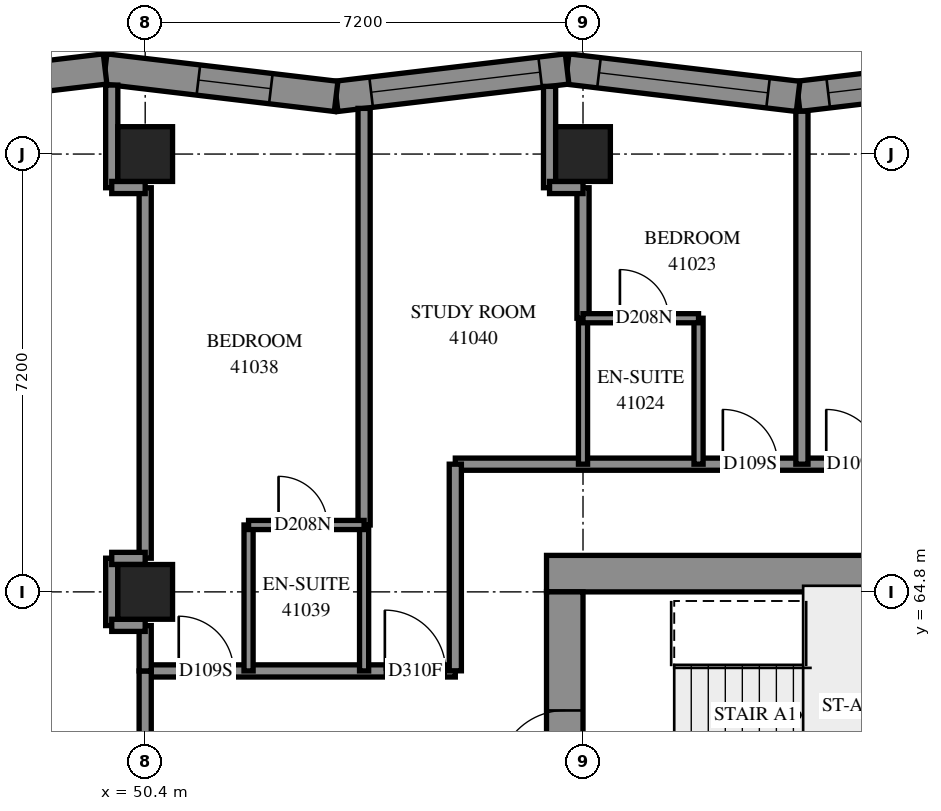
"""IFC4 building model, lengths in metres.
Left out: names, types, materials, properties, quantities, classifications, styles, units other than length and angle.
Written with IfcOpenShell. Run it as: python <this file> out.ifc"""

import sys

from ifc_helpers import new_model, si_unit, direction, frame, frame_2d, origin, origin_2d, place, context, subcontext, project, spatial, polyline, rectangle, outline, extrude, element, fill, save


model = new_model("IFC4")
c1 = context("Model", 3, precision=1e-05, world=origin(), true_north=direction((0.0, 1.0)))
c2 = subcontext(c1, "Body", "Model", "MODEL_VIEW")
j1 = project(units=[si_unit("LENGTHUNIT", "METRE"), si_unit("PLANEANGLEUNIT", "RADIAN")], contexts=[c1])
p1 = place(None, origin())
s1 = spatial("IfcSite", under=j1, at=p1, CompositionType="ELEMENT")
p2 = place(p1, origin())
s2 = spatial("IfcBuilding", under=s1, at=p2, CompositionType="ELEMENT")
p3 = place(p2, frame((0.0, 0.0, 152.4)))
s3 = spatial("IfcBuildingStorey", under=s2, at=p3, CompositionType="ELEMENT", Elevation=152.4)
for number, where, z_axis, x_axis in (
    (1, (50.4, 64.8, 0.0), (0.0, 0.0, 1.0), (1.0, 0.0, 0.0)),
    (2, (50.4, 72.0, 0.0), (0.0, 0.0, 1.0), (1.0, 0.0, 0.0)),
    (3, (57.6, 72.0, 0.0), (0.0, 0.0, 1.0), (1.0, 0.0, 0.0)),
):
    element("IfcColumn", number, at=place(p3, frame(where, z_axis=z_axis, x_axis=x_axis)), inside=s3, PredefinedType="COLUMN", context=c2, shape_type="SweptSolid", body=[
        extrude(rectangle(XDim=0.9, YDim=0.9, at=origin_2d()), origin(), (0.0, 0.0, 1.0), 3.1),
    ])
p4 = place(p3, frame((57.0, 65.1, -0.3), z_axis=(0.0, 0.0, 1.0), x_axis=(1.0, 0.0, 0.0)))
e4 = element("IfcWall", 4, at=p4, inside=s3, PredefinedType="SHEAR", context=c2, shape_type="SweptSolid", body=[
    extrude(rectangle(XDim=15.6, YDim=0.6, at=frame_2d((7.8, 0.0))), origin(), (0.0, 0.0, 1.0), 2.7),
])
p5 = place(p4, frame((10.6, 0.0, 0.3)))
e5 = element("IfcOpeningElement", 5, at=p5, cuts=e4, PredefinedType="OPENING", context=c2, shape_type="SweptSolid", body=[
    extrude(rectangle(XDim=0.8, YDim=2.1, at=frame_2d((0.4, 1.05))), frame((0.0, 0.31, 0.0), z_axis=(0.0, -1.0, 0.0), x_axis=(1.0, 0.0, 0.0)), (0.0, 0.0, 1.0), 0.62),
])
p6 = place(p3, frame((57.3, 50.4, -0.3), z_axis=(0.0, 0.0, 1.0), x_axis=(0.0, 1.0, 0.0)))
e6 = element("IfcWall", 6, at=p6, inside=s3, PredefinedType="SHEAR", context=c2, shape_type="SweptSolid", body=[
    extrude(rectangle(XDim=14.4, YDim=0.6, at=frame_2d((7.2, 0.0))), origin(), (0.0, 0.0, 1.0), 2.7),
])
p7 = place(p6, frame((4.55, 0.0, 0.3)))
e7 = element("IfcOpeningElement", 7, at=p7, cuts=e6, PredefinedType="OPENING", context=c2, shape_type="SweptSolid", body=[
    extrude(rectangle(XDim=1.1, YDim=2.1, at=frame_2d((0.55, 1.05))), frame((0.0, 0.31, 0.0), z_axis=(0.0, -1.0, 0.0), x_axis=(1.0, 0.0, 0.0)), (0.0, 0.0, 1.0), 0.62),
])
p8 = place(p6, frame((11.35, 0.0, 0.3)))
e8 = element("IfcOpeningElement", 8, at=p8, cuts=e6, PredefinedType="OPENING", context=c2, shape_type="SweptSolid", body=[
    extrude(rectangle(XDim=1.1, YDim=2.1, at=frame_2d((0.55, 1.05))), frame((0.0, 0.31, 0.0), z_axis=(0.0, -1.0, 0.0), x_axis=(1.0, 0.0, 0.0)), (0.0, 0.0, 1.0), 0.62),
])
p9 = place(p3, frame((64.937, 73.399, 0.0), z_axis=(0.0, 0.0, 1.0), x_axis=(-0.9930269402, -0.1178876415, 0.0)))
e9 = element("IfcWall", 9, at=p9, inside=s3, PredefinedType="SOLIDWALL", context=c2, shape_type="SweptSolid", body=[
    extrude(outline(polyline([(-0.03, -0.25), (3.796, -0.25), (3.855, 0.25), (0.03, 0.25), (-0.03, -0.25)])), origin(), (0.0, 0.0, 1.0), 3.1),
])
p10 = place(p9, frame((0.528, 0.0, 0.45)))
e10 = element("IfcOpeningElement", 10, at=p10, cuts=e9, PredefinedType="OPENING", context=c2, shape_type="SweptSolid", body=[
    extrude(rectangle(XDim=2.8, YDim=2.5, at=frame_2d((1.4, 1.25))), frame((0.0, 0.26, 0.0), z_axis=(0.0, -1.0, 0.0), x_axis=(1.0, 0.0, 0.0)), (0.0, 0.0, 1.0), 0.52),
])
p11 = place(p3, frame((61.138, 72.948, 0.0), z_axis=(0.0, 0.0, 1.0), x_axis=(-0.9930269402, 0.1178876415, 0.0)))
e11 = element("IfcWall", 11, at=p11, inside=s3, PredefinedType="SOLIDWALL", context=c2, shape_type="SweptSolid", body=[
    extrude(outline(polyline([(0.03, -0.25), (3.855, -0.25), (3.796, 0.25), (-0.03, 0.25), (0.03, -0.25)])), origin(), (0.0, 0.0, 1.0), 3.1),
])
p12 = place(p11, frame((0.498, 0.0, 0.45)))
e12 = element("IfcOpeningElement", 12, at=p12, cuts=e11, PredefinedType="OPENING", context=c2, shape_type="SweptSolid", body=[
    extrude(rectangle(XDim=2.8, YDim=2.5, at=frame_2d((1.4, 1.25))), frame((0.0, 0.26, 0.0), z_axis=(0.0, -1.0, 0.0), x_axis=(1.0, 0.0, 0.0)), (0.0, 0.0, 1.0), 0.52),
])
p13 = place(p3, frame((57.339, 73.399, 0.0), z_axis=(0.0, 0.0, 1.0), x_axis=(-0.9930265769, -0.1178907016, 0.0)))
e13 = element("IfcWall", 13, at=p13, inside=s3, PredefinedType="SOLIDWALL", context=c2, shape_type="SweptSolid", body=[
    extrude(outline(polyline([(-0.03, -0.25), (3.796, -0.25), (3.855, 0.25), (0.03, 0.25), (-0.03, -0.25)])), origin(), (0.0, 0.0, 1.0), 3.1),
])
p14 = place(p13, frame((0.446, 0.0, 0.45)))
e14 = element("IfcOpeningElement", 14, at=p14, cuts=e13, PredefinedType="OPENING", context=c2, shape_type="SweptSolid", body=[
    extrude(rectangle(XDim=2.8, YDim=2.5, at=frame_2d((1.4, 1.25))), frame((0.0, 0.26, 0.0), z_axis=(0.0, -1.0, 0.0), x_axis=(1.0, 0.0, 0.0)), (0.0, 0.0, 1.0), 0.52),
])
p15 = place(p3, frame((53.54, 72.948, 0.0), z_axis=(0.0, 0.0, 1.0), x_axis=(-0.9930269402, 0.1178876415, 0.0)))
e15 = element("IfcWall", 15, at=p15, inside=s3, PredefinedType="SOLIDWALL", context=c2, shape_type="SweptSolid", body=[
    extrude(outline(polyline([(0.03, -0.25), (3.855, -0.25), (3.796, 0.25), (-0.03, 0.25), (0.03, -0.25)])), origin(), (0.0, 0.0, 1.0), 3.1),
])
p16 = place(p15, frame((1.081, 0.0, 0.45)))
e16 = element("IfcOpeningElement", 16, at=p16, cuts=e15, PredefinedType="OPENING", context=c2, shape_type="SweptSolid", body=[
    extrude(rectangle(XDim=1.2, YDim=2.5, at=frame_2d((0.6, 1.25))), frame((0.0, 0.26, 0.0), z_axis=(0.0, -1.0, 0.0), x_axis=(1.0, 0.0, 0.0)), (0.0, 0.0, 1.0), 0.52),
])
p17 = place(p3, frame((49.741, 73.399, 0.0), z_axis=(0.0, 0.0, 1.0), x_axis=(-0.9930265769, -0.1178907016, 0.0)))
e17 = element("IfcWall", 17, at=p17, inside=s3, PredefinedType="SOLIDWALL", context=c2, shape_type="SweptSolid", body=[
    extrude(outline(polyline([(-0.03, -0.25), (3.796, -0.25), (3.855, 0.25), (0.03, 0.25), (-0.03, -0.25)])), origin(), (0.0, 0.0, 1.0), 3.1),
])
p18 = place(p17, frame((0.996, 0.0, 0.45)))
e18 = element("IfcOpeningElement", 18, at=p18, cuts=e17, PredefinedType="OPENING", context=c2, shape_type="SweptSolid", body=[
    extrude(rectangle(XDim=1.2, YDim=2.5, at=frame_2d((0.6, 1.25))), frame((0.0, 0.26, 0.0), z_axis=(0.0, -1.0, 0.0), x_axis=(1.0, 0.0, 0.0)), (0.0, 0.0, 1.0), 0.52),
])
p19 = place(p3, frame((55.5, 66.9, 0.0), z_axis=(0.0, 0.0, 1.0), x_axis=(1.0, 0.0, 0.0)))
e19 = element("IfcWall", 19, at=p19, inside=s3, PredefinedType="PARTITIONING", context=c2, shape_type="SweptSolid", body=[
    extrude(rectangle(XDim=18.6, YDim=0.2, at=frame_2d((9.3, 0.0))), origin(), (0.0, 0.0, 1.0), 3.1),
])
p20 = place(p19, frame((4.4, 0.0, 0.0)))
e20 = element("IfcOpeningElement", 20, at=p20, cuts=e19, PredefinedType="OPENING", context=c2, shape_type="SweptSolid", body=[
    extrude(rectangle(XDim=0.9, YDim=2.1, at=frame_2d((0.45, 1.05))), frame((0.0, 0.11, 0.0), z_axis=(0.0, -1.0, 0.0), x_axis=(1.0, 0.0, 0.0)), (0.0, 0.0, 1.0), 0.22),
])
p21 = place(p19, frame((6.1, 0.0, 0.0)))
e21 = element("IfcOpeningElement", 21, at=p21, cuts=e19, PredefinedType="OPENING", context=c2, shape_type="SweptSolid", body=[
    extrude(rectangle(XDim=0.9, YDim=2.1, at=frame_2d((0.45, 1.05))), frame((0.0, 0.11, 0.0), z_axis=(0.0, -1.0, 0.0), x_axis=(1.0, 0.0, 0.0)), (0.0, 0.0, 1.0), 0.22),
])
p22 = place(p19, frame((11.65, 0.0, 0.0)))
e22 = element("IfcOpeningElement", 22, at=p22, cuts=e19, PredefinedType="OPENING", context=c2, shape_type="SweptSolid", body=[
    extrude(rectangle(XDim=0.9, YDim=2.1, at=frame_2d((0.45, 1.05))), frame((0.0, 0.11, 0.0), z_axis=(0.0, -1.0, 0.0), x_axis=(1.0, 0.0, 0.0)), (0.0, 0.0, 1.0), 0.22),
])
p23 = place(p19, frame((13.3, 0.0, 0.0)))
e23 = element("IfcOpeningElement", 23, at=p23, cuts=e19, PredefinedType="OPENING", context=c2, shape_type="SweptSolid", body=[
    extrude(rectangle(XDim=0.9, YDim=2.1, at=frame_2d((0.45, 1.05))), frame((0.0, 0.11, 0.0), z_axis=(0.0, -1.0, 0.0), x_axis=(1.0, 0.0, 0.0)), (0.0, 0.0, 1.0), 0.22),
])
p24 = place(p3, frame((54.0, 65.9, 0.0), z_axis=(0.0, 0.0, 1.0), x_axis=(0.0, 1.0, 0.0)))
e24 = element("IfcWall", 24, at=p24, inside=s3, PredefinedType="PARTITIONING", context=c2, shape_type="SweptSolid", body=[
    extrude(rectangle(XDim=6.851, YDim=0.2, at=frame_2d((3.425, 0.0))), origin(), (0.0, 0.0, 1.0), 3.1),
])
p25 = place(p3, frame((50.4, 65.354, 0.0), z_axis=(0.0, 0.0, 1.0), x_axis=(0.0, 1.0, 0.0)))
e25 = element("IfcWall", 25, at=p25, inside=s3, PredefinedType="PARTITIONING", context=c2, shape_type="SweptSolid", body=[
    extrude(rectangle(XDim=6.092, YDim=0.2, at=frame_2d((3.046, 0.0))), origin(), (0.0, 0.0, 1.0), 3.1),
])
p26 = place(p3, frame((61.2, 66.9, 0.0), z_axis=(0.0, 0.0, 1.0), x_axis=(0.0, 1.0, 0.0)))
e26 = element("IfcWall", 26, at=p26, inside=s3, PredefinedType="PARTITIONING", context=c2, shape_type="SweptSolid", body=[
    extrude(rectangle(XDim=5.804, YDim=0.2, at=frame_2d((2.902, 0.0))), origin(), (0.0, 0.0, 1.0), 3.1),
])
p27 = place(p3, frame((50.4, 63.5, 0.0), z_axis=(0.0, 0.0, 1.0), x_axis=(1.0, 0.0, 0.0)))
e27 = element("IfcWall", 27, at=p27, inside=s3, PredefinedType="PARTITIONING", context=c2, shape_type="SweptSolid", body=[
    extrude(rectangle(XDim=5.1, YDim=0.2, at=frame_2d((2.55, 0.0))), origin(), (0.0, 0.0, 1.0), 3.1),
])
p28 = place(p27, frame((0.552, 0.0, 0.0)))
e28 = element("IfcOpeningElement", 28, at=p28, cuts=e27, PredefinedType="OPENING", context=c2, shape_type="SweptSolid", body=[
    extrude(rectangle(XDim=0.9, YDim=2.1, at=frame_2d((0.45, 1.05))), frame((0.0, 0.11, 0.0), z_axis=(0.0, -1.0, 0.0), x_axis=(1.0, 0.0, 0.0)), (0.0, 0.0, 1.0), 0.22),
])
p29 = place(p27, frame((3.941, 0.0, 0.0)))
e29 = element("IfcOpeningElement", 29, at=p29, cuts=e27, PredefinedType="OPENING", context=c2, shape_type="SweptSolid", body=[
    extrude(rectangle(XDim=1.0, YDim=2.1, at=frame_2d((0.5, 1.05))), frame((0.0, 0.11, 0.0), z_axis=(0.0, -1.0, 0.0), x_axis=(1.0, 0.0, 0.0)), (0.0, 0.0, 1.0), 0.22),
])
p30 = place(p3, frame((55.5, 63.502, 0.0), z_axis=(0.0, 0.0, 1.0), x_axis=(0.0, 1.0, 0.0)))
e30 = element("IfcWall", 30, at=p30, inside=s3, PredefinedType="PARTITIONING", context=c2, shape_type="SweptSolid", body=[
    extrude(rectangle(XDim=3.398, YDim=0.2, at=frame_2d((1.699, 0.0))), origin(), (0.0, 0.0, 1.0), 3.1),
])
for number, where, z_axis, x_axis in (
    (31, (52.1, 63.5, 0.0), (0.0, 0.0, 1.0), (0.0, 1.0, 0.0)),
    (32, (54.0, 63.5, 0.0), (0.0, 0.0, 1.0), (0.0, 1.0, 0.0)),
    (33, (59.5, 66.9, 0.0), (0.0, 0.0, 1.0), (0.0, 1.0, 0.0)),
    (34, (57.6, 66.9, 0.0), (0.0, 0.0, 1.0), (0.0, 1.0, 0.0)),
):
    element("IfcWall", number, at=place(p3, frame(where, z_axis=z_axis, x_axis=x_axis)), inside=s3, PredefinedType="PARTITIONING", context=c2, shape_type="SweptSolid", body=[
        extrude(rectangle(XDim=2.4, YDim=0.15, at=frame_2d((1.2, 0.0))), origin(), (0.0, 0.0, 1.0), 3.1),
    ])
p31 = place(p3, frame((57.6, 69.3, 0.0), z_axis=(0.0, 0.0, 1.0), x_axis=(0.0, 1.0, 0.0)))
e35 = element("IfcWall", 35, at=p31, inside=s3, PredefinedType="PARTITIONING", context=c2, shape_type="SweptSolid", body=[
    extrude(rectangle(XDim=2.146, YDim=0.2, at=frame_2d((1.073, 0.0))), origin(), (0.0, 0.0, 1.0), 3.1),
])
p32 = place(p3, frame((52.1, 65.9, 0.0), z_axis=(0.0, 0.0, 1.0), x_axis=(1.0, 0.0, 0.0)))
e36 = element("IfcWall", 36, at=p32, inside=s3, PredefinedType="PARTITIONING", context=c2, shape_type="SweptSolid", body=[
    extrude(rectangle(XDim=1.9, YDim=0.15, at=frame_2d((0.95, 0.0))), origin(), (0.0, 0.0, 1.0), 3.1),
])
p33 = place(p32, frame((0.493, 0.0, 0.0)))
e37 = element("IfcOpeningElement", 37, at=p33, cuts=e36, PredefinedType="OPENING", context=c2, shape_type="SweptSolid", body=[
    extrude(rectangle(XDim=0.8, YDim=2.1, at=frame_2d((0.4, 1.05))), frame((0.0, 0.085, 0.0), z_axis=(0.0, -1.0, 0.0), x_axis=(1.0, 0.0, 0.0)), (0.0, 0.0, 1.0), 0.17),
])
p34 = place(p3, frame((57.6, 69.3, 0.0), z_axis=(0.0, 0.0, 1.0), x_axis=(1.0, 0.0, 0.0)))
e38 = element("IfcWall", 38, at=p34, inside=s3, PredefinedType="PARTITIONING", context=c2, shape_type="SweptSolid", body=[
    extrude(rectangle(XDim=1.9, YDim=0.15, at=frame_2d((0.95, 0.0))), origin(), (0.0, 0.0, 1.0), 3.1),
])
p35 = place(p34, frame((0.607, 0.0, 0.0)))
e39 = element("IfcOpeningElement", 39, at=p35, cuts=e38, PredefinedType="OPENING", context=c2, shape_type="SweptSolid", body=[
    extrude(rectangle(XDim=0.8, YDim=2.1, at=frame_2d((0.4, 1.05))), frame((0.0, 0.085, 0.0), z_axis=(0.0, -1.0, 0.0), x_axis=(1.0, 0.0, 0.0)), (0.0, 0.0, 1.0), 0.17),
])
p36 = place(p3, frame((49.85, 71.446, 0.0), z_axis=(0.0, 0.0, 1.0), x_axis=(0.0, 1.0, 0.0)))
e40 = element("IfcWall", 40, at=p36, inside=s3, PredefinedType="PARTITIONING", context=c2, shape_type="SweptSolid", body=[
    extrude(rectangle(XDim=1.688, YDim=0.2, at=frame_2d((0.844, 0.0))), origin(), (0.0, 0.0, 1.0), 3.1),
])
p37 = place(p3, frame((57.05, 71.446, 0.0), z_axis=(0.0, 0.0, 1.0), x_axis=(0.0, 1.0, 0.0)))
e41 = element("IfcWall", 41, at=p37, inside=s3, PredefinedType="PARTITIONING", context=c2, shape_type="SweptSolid", body=[
    extrude(rectangle(XDim=1.667, YDim=0.2, at=frame_2d((0.834, 0.0))), origin(), (0.0, 0.0, 1.0), 3.1),
])
p38 = place(p3, frame((50.4, 62.302, 0.0), z_axis=(0.0, 0.0, 1.0), x_axis=(0.0, 1.0, 0.0)))
e42 = element("IfcWall", 42, at=p38, inside=s3, PredefinedType="PARTITIONING", context=c2, shape_type="SweptSolid", body=[
    extrude(rectangle(XDim=1.198, YDim=0.2, at=frame_2d((0.599, 0.0))), origin(), (0.0, 0.0, 1.0), 3.1),
])
p39 = place(p3, frame((49.85, 64.246, 0.0), z_axis=(0.0, 0.0, 1.0), x_axis=(0.0, 1.0, 0.0)))
e43 = element("IfcWall", 43, at=p39, inside=s3, PredefinedType="PARTITIONING", context=c2, shape_type="SweptSolid", body=[
    extrude(rectangle(XDim=1.108, YDim=0.2, at=frame_2d((0.554, 0.0))), origin(), (0.0, 0.0, 1.0), 3.1),
])
p40 = place(p3, frame((50.4, 63.5, 0.0), z_axis=(0.0, 0.0, 1.0), x_axis=(0.0, 1.0, 0.0)))
e44 = element("IfcWall", 44, at=p40, inside=s3, PredefinedType="PARTITIONING", context=c2, shape_type="SweptSolid", body=[
    extrude(rectangle(XDim=0.746, YDim=0.2, at=frame_2d((0.373, 0.0))), origin(), (0.0, 0.0, 1.0), 3.1),
])
for number, where, z_axis, x_axis in (
    (45, (57.05, 71.45, 0.0), (0.0, 0.0, 1.0), (1.0, 0.0, 0.0)),
    (46, (49.85, 71.45, 0.0), (0.0, 0.0, 1.0), (1.0, 0.0, 0.0)),
    (47, (49.85, 65.35, 0.0), (0.0, 0.0, 1.0), (1.0, 0.0, 0.0)),
    (48, (49.85, 64.25, 0.0), (0.0, 0.0, 1.0), (1.0, 0.0, 0.0)),
):
    element("IfcWall", number, at=place(p3, frame(where, z_axis=z_axis, x_axis=x_axis)), inside=s3, PredefinedType="PARTITIONING", context=c2, shape_type="SweptSolid", body=[
        extrude(rectangle(XDim=0.55, YDim=0.2, at=frame_2d((0.275, 0.0))), origin(), (0.0, 0.0, 1.0), 3.1),
    ])
p41 = place(p10, origin())
e49 = element("IfcWindow", 49, at=p41, inside=s3, PartitioningType="SINGLE_PANEL", PredefinedType="WINDOW", context=c2, shape_type="SweptSolid", body=[
    extrude(rectangle(XDim=2.8, YDim=2.5, at=frame_2d((1.4, 1.25))), frame((0.0, 0.18, 0.0), z_axis=(0.0, -1.0, 0.0), x_axis=(1.0, 0.0, 0.0)), (0.0, 0.0, 1.0), 0.06),
])
fill(e10, e49)
p42 = place(p12, origin())
e50 = element("IfcWindow", 50, at=p42, inside=s3, PartitioningType="SINGLE_PANEL", PredefinedType="WINDOW", context=c2, shape_type="SweptSolid", body=[
    extrude(rectangle(XDim=2.8, YDim=2.5, at=frame_2d((1.4, 1.25))), frame((0.0, 0.18, 0.0), z_axis=(0.0, -1.0, 0.0), x_axis=(1.0, 0.0, 0.0)), (0.0, 0.0, 1.0), 0.06),
])
fill(e12, e50)
p43 = place(p14, origin())
e51 = element("IfcWindow", 51, at=p43, inside=s3, PartitioningType="SINGLE_PANEL", PredefinedType="WINDOW", context=c2, shape_type="SweptSolid", body=[
    extrude(rectangle(XDim=2.8, YDim=2.5, at=frame_2d((1.4, 1.25))), frame((0.0, 0.18, 0.0), z_axis=(0.0, -1.0, 0.0), x_axis=(1.0, 0.0, 0.0)), (0.0, 0.0, 1.0), 0.06),
])
fill(e14, e51)
p44 = place(p16, origin())
e52 = element("IfcWindow", 52, at=p44, inside=s3, PartitioningType="SINGLE_PANEL", PredefinedType="WINDOW", context=c2, shape_type="SweptSolid", body=[
    extrude(rectangle(XDim=1.2, YDim=2.5, at=frame_2d((0.6, 1.25))), frame((0.0, 0.18, 0.0), z_axis=(0.0, -1.0, 0.0), x_axis=(1.0, 0.0, 0.0)), (0.0, 0.0, 1.0), 0.06),
])
fill(e16, e52)
p45 = place(p8, origin())
e53 = element("IfcDoor", 53, at=p45, inside=s3, OperationType="SINGLE_SWING_LEFT", PredefinedType="DOOR", context=c2, shape_type="SweptSolid", body=[
    extrude(rectangle(XDim=1.1, YDim=2.1, at=frame_2d((0.55, 1.05))), frame((0.0, 0.025, 0.0), z_axis=(0.0, -1.0, 0.0), x_axis=(1.0, 0.0, 0.0)), (0.0, 0.0, 1.0), 0.05),
])
fill(e8, e53)
p46 = place(p20, origin())
e54 = element("IfcDoor", 54, at=p46, inside=s3, OperationType="SINGLE_SWING_RIGHT", PredefinedType="DOOR", context=c2, shape_type="SweptSolid", body=[
    extrude(rectangle(XDim=0.9, YDim=2.1, at=frame_2d((0.45, 1.05))), frame((0.0, 0.025, 0.0), z_axis=(0.0, -1.0, 0.0), x_axis=(1.0, 0.0, 0.0)), (0.0, 0.0, 1.0), 0.05),
])
fill(e20, e54)
p47 = place(p35, origin())
e55 = element("IfcDoor", 55, at=p47, inside=s3, OperationType="SINGLE_SWING_RIGHT", PredefinedType="DOOR", context=c2, shape_type="SweptSolid", body=[
    extrude(rectangle(XDim=0.8, YDim=2.1, at=frame_2d((0.4, 1.05))), frame((0.0, 0.025, 0.0), z_axis=(0.0, -1.0, 0.0), x_axis=(1.0, 0.0, 0.0)), (0.0, 0.0, 1.0), 0.05),
])
fill(e39, e55)
p48 = place(p21, origin())
e56 = element("IfcDoor", 56, at=p48, inside=s3, OperationType="SINGLE_SWING_LEFT", PredefinedType="DOOR", context=c2, shape_type="SweptSolid", body=[
    extrude(rectangle(XDim=0.9, YDim=2.1, at=frame_2d((0.45, 1.05))), frame((0.0, 0.025, 0.0), z_axis=(0.0, -1.0, 0.0), x_axis=(1.0, 0.0, 0.0)), (0.0, 0.0, 1.0), 0.05),
])
fill(e21, e56)
p49 = place(p28, origin())
e57 = element("IfcDoor", 57, at=p49, inside=s3, OperationType="SINGLE_SWING_RIGHT", PredefinedType="DOOR", context=c2, shape_type="SweptSolid", body=[
    extrude(rectangle(XDim=0.9, YDim=2.1, at=frame_2d((0.45, 1.05))), frame((0.0, 0.025, 0.0), z_axis=(0.0, -1.0, 0.0), x_axis=(1.0, 0.0, 0.0)), (0.0, 0.0, 1.0), 0.05),
])
fill(e28, e57)
p50 = place(p33, origin())
e58 = element("IfcDoor", 58, at=p50, inside=s3, OperationType="SINGLE_SWING_RIGHT", PredefinedType="DOOR", context=c2, shape_type="SweptSolid", body=[
    extrude(rectangle(XDim=0.8, YDim=2.1, at=frame_2d((0.4, 1.05))), frame((0.0, 0.025, 0.0), z_axis=(0.0, -1.0, 0.0), x_axis=(1.0, 0.0, 0.0)), (0.0, 0.0, 1.0), 0.05),
])
fill(e37, e58)
p51 = place(p29, origin())
e59 = element("IfcDoor", 59, at=p51, inside=s3, OperationType="SINGLE_SWING_LEFT", PredefinedType="DOOR", context=c2, shape_type="SweptSolid", body=[
    extrude(rectangle(XDim=1.0, YDim=2.1, at=frame_2d((0.5, 1.05))), frame((0.0, 0.025, 0.0), z_axis=(0.0, -1.0, 0.0), x_axis=(1.0, 0.0, 0.0)), (0.0, 0.0, 1.0), 0.05),
])
fill(e29, e59)
save(model, sys.argv[1])
